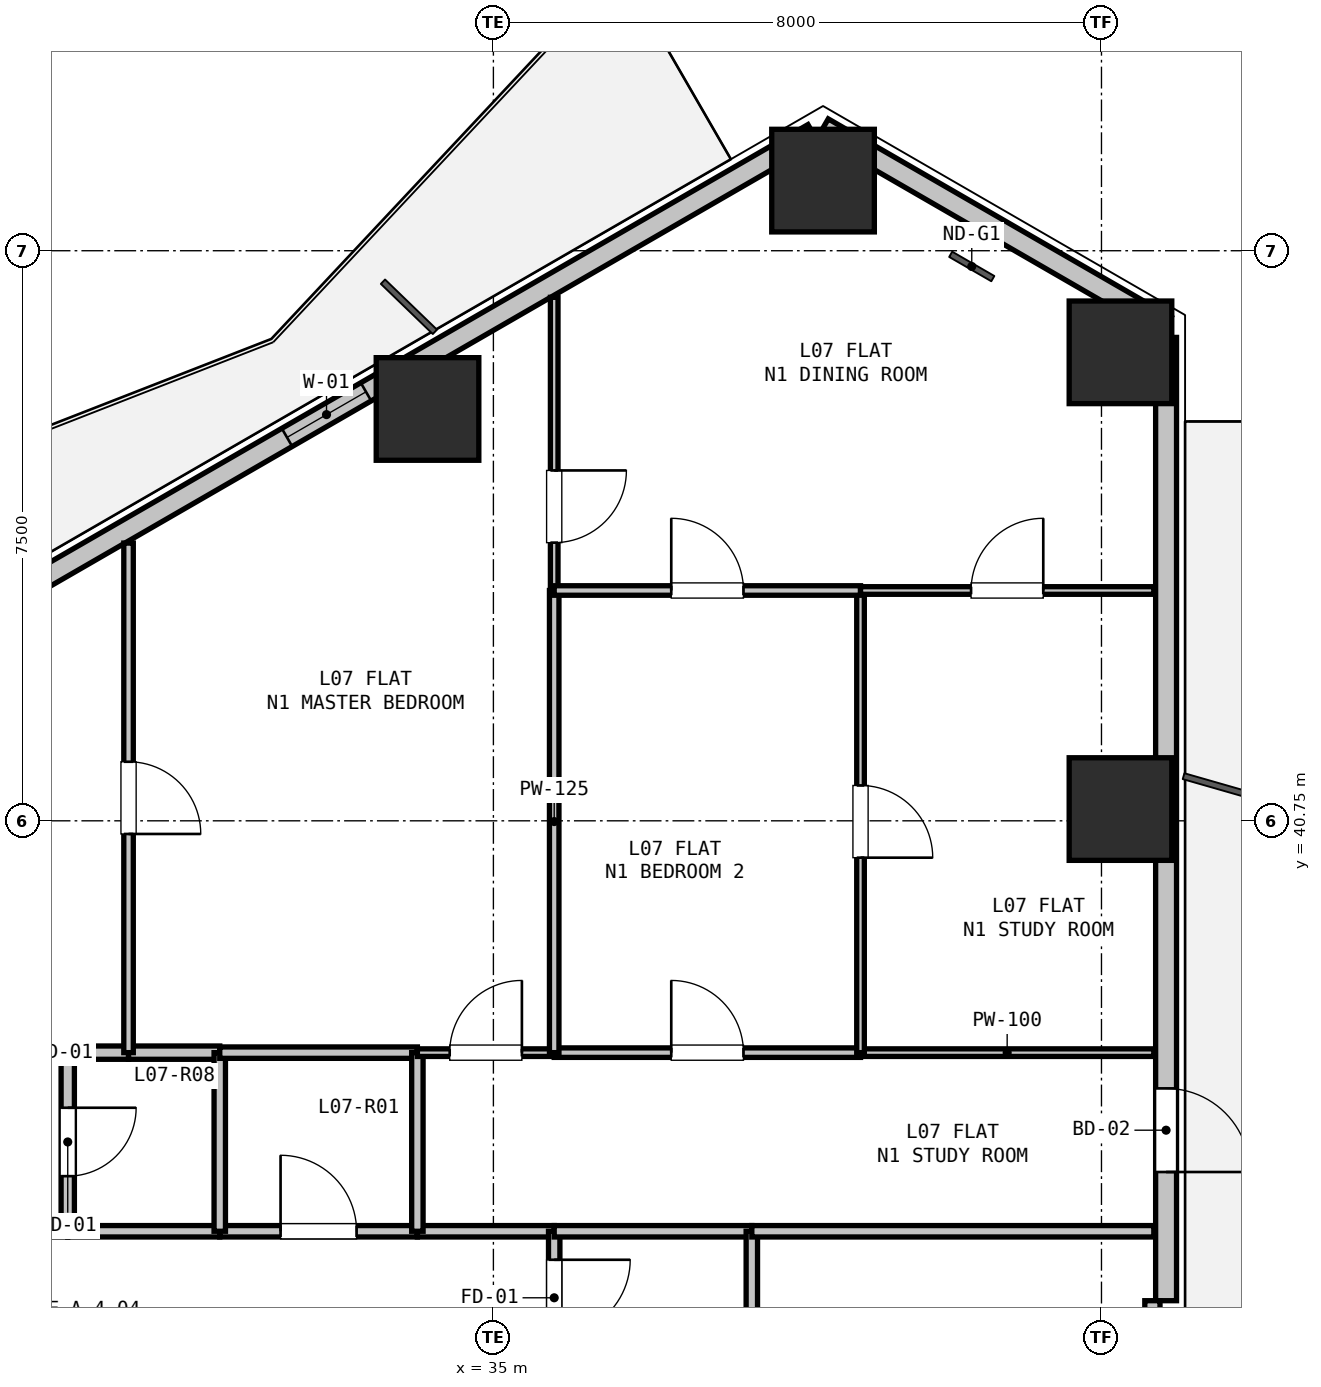
"""IFC4 building model, lengths in metres.
Left out: names, types, materials, properties, quantities, classifications, styles, units other than length and angle.
Written with IfcOpenShell. Run it as: python <this file> out.ifc"""

import sys

from ifc_helpers import new_model, si_unit, direction, frame, frame_2d, origin, origin_2d, place, context, subcontext, project, spatial, rectangle, hollow_rectangle, extrude, element, fill, save


model = new_model("IFC4")
c1 = context("Model", 3, precision=1e-05, world=origin(), true_north=direction((0.0, 1.0)))
c2 = subcontext(c1, "Body", "Model", "MODEL_VIEW")
j1 = project(units=[si_unit("LENGTHUNIT", "METRE"), si_unit("PLANEANGLEUNIT", "RADIAN")], contexts=[c1])
p1 = place(None, origin())
s1 = spatial("IfcSite", under=j1, at=p1, CompositionType="ELEMENT")
p2 = place(p1, origin())
s2 = spatial("IfcBuilding", under=s1, at=p2, CompositionType="ELEMENT")
p3 = place(p2, frame((0.0, 0.0, 29.1)))
s3 = spatial("IfcBuildingStorey", under=s2, at=p3, CompositionType="ELEMENT", Elevation=29.1)
for number, where, z_axis, x_axis in (
    (1, (34.133, 46.168, 0.0), (0.0, 0.0, 1.0), (1.0, 0.0, 0.0)),
    (2, (39.337, 49.173, 0.0), (0.0, 0.0, 1.0), (1.0, 0.0, 0.0)),
    (3, (43.25, 46.913, 0.0), (0.0, 0.0, 1.0), (1.0, 0.0, 0.0)),
    (4, (43.25, 40.905, 0.0), (0.0, 0.0, 1.0), (1.0, 0.0, 0.0)),
):
    element("IfcColumn", number, at=place(p3, frame(where, z_axis=z_axis, x_axis=x_axis)), inside=s3, PredefinedType="COLUMN", context=c2, shape_type="SweptSolid", body=[
        extrude(hollow_rectangle(XDim=1.35, YDim=1.35, WallThickness=0.036, at=origin_2d()), origin(), (0.0, 0.0, 1.0), 3.3),
    ])
p4 = place(p3, frame((39.337, 49.865, 0.0), z_axis=(0.0, 0.0, 1.0), x_axis=(0.866043601342, -0.499968479581, 0.0)))
e5 = element("IfcWall", 5, at=p4, inside=s3, PredefinedType="SOLIDWALL", context=c2, shape_type="SweptSolid", body=[
    extrude(rectangle(XDim=5.211, YDim=0.275, at=frame_2d((2.605, 0.0))), origin(), (0.0, 0.0, 1.0), 2.66),
])
p5 = place(p3, frame((28.232, 43.454, 0.0), z_axis=(0.0, 0.0, 1.0), x_axis=(0.86603192154, 0.499988710747, 0.0)))
e6 = element("IfcWall", 6, at=p5, inside=s3, PredefinedType="SOLIDWALL", context=c2, shape_type="SweptSolid", body=[
    extrude(rectangle(XDim=12.673, YDim=0.275, at=frame_2d((6.336, 0.0))), origin(), (0.0, 0.0, 1.0), 2.66),
])
p6 = place(p5, frame((4.68, 0.0, 0.9)))
e7 = element("IfcOpeningElement", 7, at=p6, cuts=e6, PredefinedType="OPENING", context=c2, shape_type="SweptSolid", body=[
    extrude(rectangle(XDim=1.2, YDim=1.4, at=frame_2d((0.6, 0.7))), frame((0.0, 0.147, 0.0), z_axis=(0.0, -1.0, 0.0), x_axis=(1.0, 0.0, 0.0)), (0.0, 0.0, 1.0), 0.295),
])
p7 = place(p3, frame((43.85, 47.11, 0.0), z_axis=(0.0, 0.0, 1.0), x_axis=(0.0, -1.0, 0.0)))
e8 = element("IfcWall", 8, at=p7, inside=s3, PredefinedType="SOLIDWALL", context=c2, shape_type="SweptSolid", body=[
    extrude(rectangle(XDim=12.673, YDim=0.275, at=frame_2d((6.336, 0.0))), origin(), (0.0, 0.0, 1.0), 2.66),
])
p8 = place(p7, frame((9.88, 0.0, 0.0)))
e9 = element("IfcOpeningElement", 9, at=p8, cuts=e8, PredefinedType="OPENING", context=c2, shape_type="SweptSolid", body=[
    extrude(rectangle(XDim=1.1, YDim=2.1, at=frame_2d((0.55, 1.05))), frame((0.0, 0.147, 0.0), z_axis=(0.0, -1.0, 0.0), x_axis=(1.0, 0.0, 0.0)), (0.0, 0.0, 1.0), 0.295),
])
p9 = place(p3, frame((43.67, 34.437, 0.0), z_axis=(0.0, 0.0, 1.0), x_axis=(0.0, -1.0, 0.0)))
e10 = element("IfcWall", 10, at=p9, inside=s3, PredefinedType="PARAPET", context=c2, shape_type="SweptSolid", body=[
    extrude(rectangle(XDim=1.7, YDim=0.2, at=frame_2d((0.85, 0.0))), origin(), (0.0, 0.0, 1.0), 2.66),
])
p10 = place(p3, frame((26.8, 35.35, 0.0), z_axis=(0.0, 0.0, 1.0), x_axis=(1.0, 0.0, 0.0)))
e11 = element("IfcWall", 11, at=p10, inside=s3, PredefinedType="PARTITIONING", context=c2, shape_type="SweptSolid", body=[
    extrude(rectangle(XDim=2.6, YDim=0.15, at=frame_2d((1.3, 0.0))), origin(), (0.0, 0.0, 1.0), 3.04),
])
p11 = place(p10, frame((0.8, 0.0, 0.0)))
e12 = element("IfcOpeningElement", 12, at=p11, cuts=e11, PredefinedType="OPENING", context=c2, shape_type="SweptSolid", body=[
    extrude(rectangle(XDim=1.0, YDim=2.15, at=frame_2d((0.5, 1.075))), frame((0.0, 0.085, 0.0), z_axis=(0.0, -1.0, 0.0), x_axis=(1.0, 0.0, 0.0)), (0.0, 0.0, 1.0), 0.17),
])
p12 = place(p3, frame((29.4, 35.35, 0.0), z_axis=(0.0, 0.0, 1.0), x_axis=(1.0, 0.0, 0.0)))
e13 = element("IfcWall", 13, at=p12, inside=s3, PredefinedType="PARTITIONING", context=c2, shape_type="SweptSolid", body=[
    extrude(rectangle(XDim=2.0, YDim=0.15, at=frame_2d((1.0, 0.0))), origin(), (0.0, 0.0, 1.0), 3.04),
])
p13 = place(p3, frame((31.4, 35.35, 0.0), z_axis=(0.0, 0.0, 1.0), x_axis=(1.0, 0.0, 0.0)))
e14 = element("IfcWall", 14, at=p13, inside=s3, PredefinedType="PARTITIONING", context=c2, shape_type="SweptSolid", body=[
    extrude(rectangle(XDim=2.6, YDim=0.15, at=frame_2d((1.3, 0.0))), origin(), (0.0, 0.0, 1.0), 3.04),
])
p14 = place(p13, frame((0.8, 0.0, 0.0)))
e15 = element("IfcOpeningElement", 15, at=p14, cuts=e14, PredefinedType="OPENING", context=c2, shape_type="SweptSolid", body=[
    extrude(rectangle(XDim=1.0, YDim=2.15, at=frame_2d((0.5, 1.075))), frame((0.0, 0.085, 0.0), z_axis=(0.0, -1.0, 0.0), x_axis=(1.0, 0.0, 0.0)), (0.0, 0.0, 1.0), 0.17),
])
p15 = place(p3, frame((34.0, 35.35, 0.0), z_axis=(0.0, 0.0, 1.0), x_axis=(1.0, 0.0, 0.0)))
e16 = element("IfcWall", 16, at=p15, inside=s3, PredefinedType="PARTITIONING", context=c2, shape_type="SweptSolid", body=[
    extrude(rectangle(XDim=1.8, YDim=0.15, at=frame_2d((0.9, 0.0))), origin(), (0.0, 0.0, 1.0), 3.04),
])
p16 = place(p3, frame((35.8, 35.35, 0.0), z_axis=(0.0, 0.0, 1.0), x_axis=(0.0, -1.0, 0.0)))
e17 = element("IfcWall", 17, at=p16, inside=s3, PredefinedType="PARTITIONING", context=c2, shape_type="SweptSolid", body=[
    extrude(rectangle(XDim=1.75, YDim=0.15, at=frame_2d((0.875, 0.0))), origin(), (0.0, 0.0, 1.0), 3.04),
])
p17 = place(p16, frame((0.375, 0.0, 0.0)))
e18 = element("IfcOpeningElement", 18, at=p17, cuts=e17, PredefinedType="OPENING", context=c2, shape_type="SweptSolid", body=[
    extrude(rectangle(XDim=1.0, YDim=2.15, at=frame_2d((0.5, 1.075))), frame((0.0, 0.085, 0.0), z_axis=(0.0, -1.0, 0.0), x_axis=(1.0, 0.0, 0.0)), (0.0, 0.0, 1.0), 0.17),
])
p18 = place(p3, frame((35.8, 35.35, 0.0), z_axis=(0.0, 0.0, 1.0), x_axis=(1.0, 0.0, 0.0)))
e19 = element("IfcWall", 19, at=p18, inside=s3, PredefinedType="PARTITIONING", context=c2, shape_type="SweptSolid", body=[
    extrude(rectangle(XDim=2.6, YDim=0.15, at=frame_2d((1.3, 0.0))), origin(), (0.0, 0.0, 1.0), 2.337),
])
p19 = place(p3, frame((38.4, 35.35, 0.0), z_axis=(0.0, 0.0, 1.0), x_axis=(0.0, -1.0, 0.0)))
e20 = element("IfcWall", 20, at=p19, inside=s3, PredefinedType="PARTITIONING", context=c2, shape_type="SweptSolid", body=[
    extrude(rectangle(XDim=5.35, YDim=0.15, at=frame_2d((2.675, 0.0))), origin(), (0.0, 0.0, 1.0), 2.337),
])
p20 = place(p3, frame((26.8, 37.7, 0.0), z_axis=(0.0, 0.0, 1.0), x_axis=(1.0, 0.0, 0.0)))
e21 = element("IfcWall", 21, at=p20, inside=s3, PredefinedType="PARTITIONING", context=c2, shape_type="SweptSolid", body=[
    extrude(rectangle(XDim=2.6, YDim=0.1, at=frame_2d((1.3, 0.0))), origin(), (0.0, 0.0, 1.0), 3.04),
])
p21 = place(p20, frame((0.825, 0.0, 0.0)))
e22 = element("IfcOpeningElement", 22, at=p21, cuts=e21, PredefinedType="OPENING", context=c2, shape_type="SweptSolid", body=[
    extrude(rectangle(XDim=0.95, YDim=2.1, at=frame_2d((0.475, 1.05))), frame((0.0, 0.06, 0.0), z_axis=(0.0, -1.0, 0.0), x_axis=(1.0, 0.0, 0.0)), (0.0, 0.0, 1.0), 0.12),
])
p22 = place(p3, frame((29.4, 37.7, 0.0), z_axis=(0.0, 0.0, 1.0), x_axis=(0.0, -1.0, 0.0)))
e23 = element("IfcWall", 23, at=p22, inside=s3, PredefinedType="PLUMBINGWALL", context=c2, shape_type="SweptSolid", body=[
    extrude(rectangle(XDim=2.35, YDim=0.175, at=frame_2d((1.175, 0.0))), origin(), (0.0, 0.0, 1.0), 3.04),
])
p23 = place(p22, frame((0.725, 0.0, 0.0)))
e24 = element("IfcOpeningElement", 24, at=p23, cuts=e23, PredefinedType="OPENING", context=c2, shape_type="SweptSolid", body=[
    extrude(rectangle(XDim=0.9, YDim=2.1, at=frame_2d((0.45, 1.05))), frame((0.0, 0.097, 0.0), z_axis=(0.0, -1.0, 0.0), x_axis=(1.0, 0.0, 0.0)), (0.0, 0.0, 1.0), 0.195),
])
p24 = place(p3, frame((29.4, 37.7, 0.0), z_axis=(0.0, 0.0, 1.0), x_axis=(1.0, 0.0, 0.0)))
e25 = element("IfcWall", 25, at=p24, inside=s3, PredefinedType="PLUMBINGWALL", context=c2, shape_type="SweptSolid", body=[
    extrude(rectangle(XDim=0.8, YDim=0.175, at=frame_2d((0.4, 0.0))), origin(), (0.0, 0.0, 1.0), 3.04),
])
p25 = place(p3, frame((30.2, 37.7, 0.0), z_axis=(0.0, 0.0, 1.0), x_axis=(1.0, 0.0, 0.0)))
e26 = element("IfcWall", 26, at=p25, inside=s3, PredefinedType="PLUMBINGWALL", context=c2, shape_type="SweptSolid", body=[
    extrude(rectangle(XDim=1.2, YDim=0.175, at=frame_2d((0.6, 0.0))), origin(), (0.0, 0.0, 1.0), 3.04),
])
p26 = place(p3, frame((31.4, 37.7, 0.0), z_axis=(0.0, 0.0, 1.0), x_axis=(0.0, -1.0, 0.0)))
e27 = element("IfcWall", 27, at=p26, inside=s3, PredefinedType="PARTITIONING", context=c2, shape_type="SweptSolid", body=[
    extrude(rectangle(XDim=2.35, YDim=0.15, at=frame_2d((1.175, 0.0))), origin(), (0.0, 0.0, 1.0), 3.04),
])
p27 = place(p3, frame((31.4, 37.7, 0.0), z_axis=(0.0, 0.0, 1.0), x_axis=(1.0, 0.0, 0.0)))
e28 = element("IfcWall", 28, at=p27, inside=s3, PredefinedType="PARTITIONING", context=c2, shape_type="SweptSolid", body=[
    extrude(rectangle(XDim=2.6, YDim=0.15, at=frame_2d((1.3, 0.0))), origin(), (0.0, 0.0, 1.0), 3.04),
])
p28 = place(p3, frame((34.0, 37.7, 0.0), z_axis=(0.0, 0.0, 1.0), x_axis=(0.0, -1.0, 0.0)))
e29 = element("IfcWall", 29, at=p28, inside=s3, PredefinedType="PARTITIONING", context=c2, shape_type="SweptSolid", body=[
    extrude(rectangle(XDim=2.35, YDim=0.15, at=frame_2d((1.175, 0.0))), origin(), (0.0, 0.0, 1.0), 3.04),
])
p29 = place(p3, frame((43.688, 35.35, 0.0), z_axis=(0.0, 0.0, 1.0), x_axis=(-1.0, 0.0, 0.0)))
e30 = element("IfcWall", 30, at=p29, inside=s3, PredefinedType="PARTITIONING", context=c2, shape_type="SweptSolid", body=[
    extrude(rectangle(XDim=5.289, YDim=0.15, at=frame_2d((2.644, 0.0))), origin(), (0.0, 0.0, 1.0), 2.337),
])
p30 = place(p3, frame((34.0, 37.7, 0.0), z_axis=(0.0, 0.0, 1.0), x_axis=(1.0, 0.0, 0.0)))
e31 = element("IfcWall", 31, at=p30, inside=s3, PredefinedType="PARTITIONING", context=c2, shape_type="SweptSolid", body=[
    extrude(rectangle(XDim=1.8, YDim=0.1, at=frame_2d((0.9, 0.0))), origin(), (0.0, 0.0, 1.0), 3.04),
])
p31 = place(p30, frame((0.425, 0.0, 0.0)))
e32 = element("IfcOpeningElement", 32, at=p31, cuts=e31, PredefinedType="OPENING", context=c2, shape_type="SweptSolid", body=[
    extrude(rectangle(XDim=0.95, YDim=2.1, at=frame_2d((0.475, 1.05))), frame((0.0, 0.06, 0.0), z_axis=(0.0, -1.0, 0.0), x_axis=(1.0, 0.0, 0.0)), (0.0, 0.0, 1.0), 0.12),
])
p32 = place(p3, frame((35.8, 37.7, 0.0), z_axis=(0.0, 0.0, 1.0), x_axis=(1.0, 0.0, 0.0)))
e33 = element("IfcWall", 33, at=p32, inside=s3, PredefinedType="PARTITIONING", context=c2, shape_type="SweptSolid", body=[
    extrude(rectangle(XDim=4.03, YDim=0.125, at=frame_2d((2.015, 0.0))), origin(), (0.0, 0.0, 1.0), 2.337),
])
p33 = place(p32, frame((1.54, 0.0, 0.0)))
e34 = element("IfcOpeningElement", 34, at=p33, cuts=e33, PredefinedType="OPENING", context=c2, shape_type="SweptSolid", body=[
    extrude(rectangle(XDim=0.95, YDim=2.1, at=frame_2d((0.475, 1.05))), frame((0.0, 0.073, 0.0), z_axis=(0.0, -1.0, 0.0), x_axis=(1.0, 0.0, 0.0)), (0.0, 0.0, 1.0), 0.145),
])
p34 = place(p3, frame((39.83, 37.7, 0.0), z_axis=(0.0, 0.0, 1.0), x_axis=(1.0, 0.0, 0.0)))
e35 = element("IfcWall", 35, at=p34, inside=s3, PredefinedType="PARTITIONING", context=c2, shape_type="SweptSolid", body=[
    extrude(rectangle(XDim=3.858, YDim=0.1, at=frame_2d((1.929, 0.0))), origin(), (0.0, 0.0, 1.0), 2.337),
])
p35 = place(p3, frame((30.2, 44.404, 0.0), z_axis=(0.0, 0.0, 1.0), x_axis=(0.0, -1.0, 0.0)))
e36 = element("IfcWall", 36, at=p35, inside=s3, PredefinedType="PARTITIONING", context=c2, shape_type="SweptSolid", body=[
    extrude(rectangle(XDim=6.704, YDim=0.125, at=frame_2d((3.352, 0.0))), origin(), (0.0, 0.0, 1.0), 2.365),
])
p36 = place(p35, frame((2.877, 0.0, 0.0)))
e37 = element("IfcOpeningElement", 37, at=p36, cuts=e36, PredefinedType="OPENING", context=c2, shape_type="SweptSolid", body=[
    extrude(rectangle(XDim=0.95, YDim=2.1, at=frame_2d((0.475, 1.05))), frame((0.0, 0.073, 0.0), z_axis=(0.0, -1.0, 0.0), x_axis=(1.0, 0.0, 0.0)), (0.0, 0.0, 1.0), 0.145),
])
p37 = place(p3, frame((35.8, 47.637, 0.0), z_axis=(0.0, 0.0, 1.0), x_axis=(0.0, -1.0, 0.0)))
e38 = element("IfcWall", 38, at=p37, inside=s3, PredefinedType="PARTITIONING", context=c2, shape_type="SweptSolid", body=[
    extrude(rectangle(XDim=3.857, YDim=0.1, at=frame_2d((1.928, 0.0))), origin(), (0.0, 0.0, 1.0), 2.65),
])
p38 = place(p37, frame((2.277, 0.0, 0.0)))
e39 = element("IfcOpeningElement", 39, at=p38, cuts=e38, PredefinedType="OPENING", context=c2, shape_type="SweptSolid", body=[
    extrude(rectangle(XDim=0.95, YDim=2.1, at=frame_2d((0.475, 1.05))), frame((0.0, 0.06, 0.0), z_axis=(0.0, -1.0, 0.0), x_axis=(1.0, 0.0, 0.0)), (0.0, 0.0, 1.0), 0.12),
])
p39 = place(p3, frame((35.8, 43.78, 0.0), z_axis=(0.0, 0.0, 1.0), x_axis=(0.0, -1.0, 0.0)))
e40 = element("IfcWall", 40, at=p39, inside=s3, PredefinedType="PARTITIONING", context=c2, shape_type="SweptSolid", body=[
    extrude(rectangle(XDim=6.08, YDim=0.125, at=frame_2d((3.04, 0.0))), origin(), (0.0, 0.0, 1.0), 3.04),
])
p40 = place(p3, frame((39.83, 43.78, 0.0), z_axis=(0.0, 0.0, 1.0), x_axis=(0.0, -1.0, 0.0)))
e41 = element("IfcWall", 41, at=p40, inside=s3, PredefinedType="PARTITIONING", context=c2, shape_type="SweptSolid", body=[
    extrude(rectangle(XDim=6.08, YDim=0.1, at=frame_2d((3.04, 0.0))), origin(), (0.0, 0.0, 1.0), 3.04),
])
p41 = place(p40, frame((2.565, 0.0, 0.0)))
e42 = element("IfcOpeningElement", 42, at=p41, cuts=e41, PredefinedType="OPENING", context=c2, shape_type="SweptSolid", body=[
    extrude(rectangle(XDim=0.95, YDim=2.1, at=frame_2d((0.475, 1.05))), frame((0.0, 0.06, 0.0), z_axis=(0.0, -1.0, 0.0), x_axis=(1.0, 0.0, 0.0)), (0.0, 0.0, 1.0), 0.12),
])
p42 = place(p3, frame((35.8, 43.78, 0.0), z_axis=(0.0, 0.0, 1.0), x_axis=(1.0, 0.0, 0.0)))
e43 = element("IfcWall", 43, at=p42, inside=s3, PredefinedType="PARTITIONING", context=c2, shape_type="SweptSolid", body=[
    extrude(rectangle(XDim=4.03, YDim=0.125, at=frame_2d((2.015, 0.0))), origin(), (0.0, 0.0, 1.0), 2.337),
])
p43 = place(p42, frame((1.54, 0.0, 0.0)))
e44 = element("IfcOpeningElement", 44, at=p43, cuts=e43, PredefinedType="OPENING", context=c2, shape_type="SweptSolid", body=[
    extrude(rectangle(XDim=0.95, YDim=2.1, at=frame_2d((0.475, 1.05))), frame((0.0, 0.073, 0.0), z_axis=(0.0, -1.0, 0.0), x_axis=(1.0, 0.0, 0.0)), (0.0, 0.0, 1.0), 0.145),
])
p44 = place(p3, frame((39.83, 43.78, 0.0), z_axis=(0.0, 0.0, 1.0), x_axis=(1.0, 0.0, 0.0)))
e45 = element("IfcWall", 45, at=p44, inside=s3, PredefinedType="PARTITIONING", context=c2, shape_type="SweptSolid", body=[
    extrude(rectangle(XDim=3.858, YDim=0.1, at=frame_2d((1.929, 0.0))), origin(), (0.0, 0.0, 1.0), 2.65),
])
p45 = place(p44, frame((1.454, 0.0, 0.0)))
e46 = element("IfcOpeningElement", 46, at=p45, cuts=e45, PredefinedType="OPENING", context=c2, shape_type="SweptSolid", body=[
    extrude(rectangle(XDim=0.95, YDim=2.1, at=frame_2d((0.475, 1.05))), frame((0.0, 0.06, 0.0), z_axis=(0.0, -1.0, 0.0), x_axis=(1.0, 0.0, 0.0)), (0.0, 0.0, 1.0), 0.12),
])
p46 = place(p6, origin())
e47 = element("IfcWindow", 47, at=p46, inside=s3, PartitioningType="SINGLE_PANEL", PredefinedType="WINDOW", context=c2, shape_type="SweptSolid", body=[
    extrude(rectangle(XDim=1.2, YDim=1.4, at=frame_2d((0.6, 0.7))), frame((0.0, 0.03, 0.0), z_axis=(0.0, -1.0, 0.0), x_axis=(1.0, 0.0, 0.0)), (0.0, 0.0, 1.0), 0.06),
])
fill(e7, e47)
p47 = place(p8, origin())
e48 = element("IfcDoor", 48, at=p47, inside=s3, OperationType="SINGLE_SWING_RIGHT", PredefinedType="DOOR", context=c2, shape_type="SweptSolid", body=[
    extrude(rectangle(XDim=1.1, YDim=2.1, at=frame_2d((0.55, 1.05))), frame((0.0, 0.025, 0.0), z_axis=(0.0, -1.0, 0.0), x_axis=(1.0, 0.0, 0.0)), (0.0, 0.0, 1.0), 0.05),
])
fill(e9, e48)
p48 = place(p17, origin())
e49 = element("IfcDoor", 49, at=p48, inside=s3, OperationType="SINGLE_SWING_LEFT", PredefinedType="DOOR", context=c2, shape_type="SweptSolid", body=[
    extrude(rectangle(XDim=1.0, YDim=2.15, at=frame_2d((0.5, 1.075))), frame((0.0, 0.025, 0.0), z_axis=(0.0, -1.0, 0.0), x_axis=(1.0, 0.0, 0.0)), (0.0, 0.0, 1.0), 0.05),
])
fill(e18, e49)
p49 = place(p14, origin())
e50 = element("IfcDoor", 50, at=p49, inside=s3, OperationType="SINGLE_SWING_LEFT", PredefinedType="DOOR", context=c2, shape_type="SweptSolid", body=[
    extrude(rectangle(XDim=1.0, YDim=2.15, at=frame_2d((0.5, 1.075))), frame((0.0, 0.025, 0.0), z_axis=(0.0, -1.0, 0.0), x_axis=(1.0, 0.0, 0.0)), (0.0, 0.0, 1.0), 0.05),
])
fill(e15, e50)
p50 = place(p23, origin())
e51 = element("IfcDoor", 51, at=p50, inside=s3, OperationType="SINGLE_SWING_LEFT", PredefinedType="DOOR", context=c2, shape_type="SweptSolid", body=[
    extrude(rectangle(XDim=0.9, YDim=2.1, at=frame_2d((0.45, 1.05))), frame((0.0, 0.025, 0.0), z_axis=(0.0, -1.0, 0.0), x_axis=(1.0, 0.0, 0.0)), (0.0, 0.0, 1.0), 0.05),
])
fill(e24, e51)
p51 = place(p31, origin())
e52 = element("IfcDoor", 52, at=p51, inside=s3, OperationType="SINGLE_SWING_RIGHT", PredefinedType="DOOR", context=c2, shape_type="SweptSolid", body=[
    extrude(rectangle(XDim=0.95, YDim=2.1, at=frame_2d((0.475, 1.05))), frame((0.0, 0.025, 0.0), z_axis=(0.0, -1.0, 0.0), x_axis=(1.0, 0.0, 0.0)), (0.0, 0.0, 1.0), 0.05),
])
fill(e32, e52)
p52 = place(p33, origin())
e53 = element("IfcDoor", 53, at=p52, inside=s3, OperationType="SINGLE_SWING_LEFT", PredefinedType="DOOR", context=c2, shape_type="SweptSolid", body=[
    extrude(rectangle(XDim=0.95, YDim=2.1, at=frame_2d((0.475, 1.05))), frame((0.0, 0.025, 0.0), z_axis=(0.0, -1.0, 0.0), x_axis=(1.0, 0.0, 0.0)), (0.0, 0.0, 1.0), 0.05),
])
fill(e34, e53)
p53 = place(p36, origin())
e54 = element("IfcDoor", 54, at=p53, inside=s3, OperationType="SINGLE_SWING_RIGHT", PredefinedType="DOOR", context=c2, shape_type="SweptSolid", body=[
    extrude(rectangle(XDim=0.95, YDim=2.1, at=frame_2d((0.475, 1.05))), frame((0.0, 0.025, 0.0), z_axis=(0.0, -1.0, 0.0), x_axis=(1.0, 0.0, 0.0)), (0.0, 0.0, 1.0), 0.05),
])
fill(e37, e54)
p54 = place(p38, origin())
e55 = element("IfcDoor", 55, at=p54, inside=s3, OperationType="SINGLE_SWING_LEFT", PredefinedType="DOOR", context=c2, shape_type="SweptSolid", body=[
    extrude(rectangle(XDim=0.95, YDim=2.1, at=frame_2d((0.475, 1.05))), frame((0.0, 0.025, 0.0), z_axis=(0.0, -1.0, 0.0), x_axis=(1.0, 0.0, 0.0)), (0.0, 0.0, 1.0), 0.05),
])
fill(e39, e55)
p55 = place(p41, origin())
e56 = element("IfcDoor", 56, at=p55, inside=s3, OperationType="SINGLE_SWING_RIGHT", PredefinedType="DOOR", context=c2, shape_type="SweptSolid", body=[
    extrude(rectangle(XDim=0.95, YDim=2.1, at=frame_2d((0.475, 1.05))), frame((0.0, 0.025, 0.0), z_axis=(0.0, -1.0, 0.0), x_axis=(1.0, 0.0, 0.0)), (0.0, 0.0, 1.0), 0.05),
])
fill(e42, e56)
p56 = place(p43, origin())
e57 = element("IfcDoor", 57, at=p56, inside=s3, OperationType="SINGLE_SWING_LEFT", PredefinedType="DOOR", context=c2, shape_type="SweptSolid", body=[
    extrude(rectangle(XDim=0.95, YDim=2.1, at=frame_2d((0.475, 1.05))), frame((0.0, 0.025, 0.0), z_axis=(0.0, -1.0, 0.0), x_axis=(1.0, 0.0, 0.0)), (0.0, 0.0, 1.0), 0.05),
])
fill(e44, e57)
p57 = place(p45, origin())
e58 = element("IfcDoor", 58, at=p57, inside=s3, OperationType="SINGLE_SWING_RIGHT", PredefinedType="DOOR", context=c2, shape_type="SweptSolid", body=[
    extrude(rectangle(XDim=0.95, YDim=2.1, at=frame_2d((0.475, 1.05))), frame((0.0, 0.025, 0.0), z_axis=(0.0, -1.0, 0.0), x_axis=(1.0, 0.0, 0.0)), (0.0, 0.0, 1.0), 0.05),
])
fill(e46, e58)
save(model, sys.argv[1])
